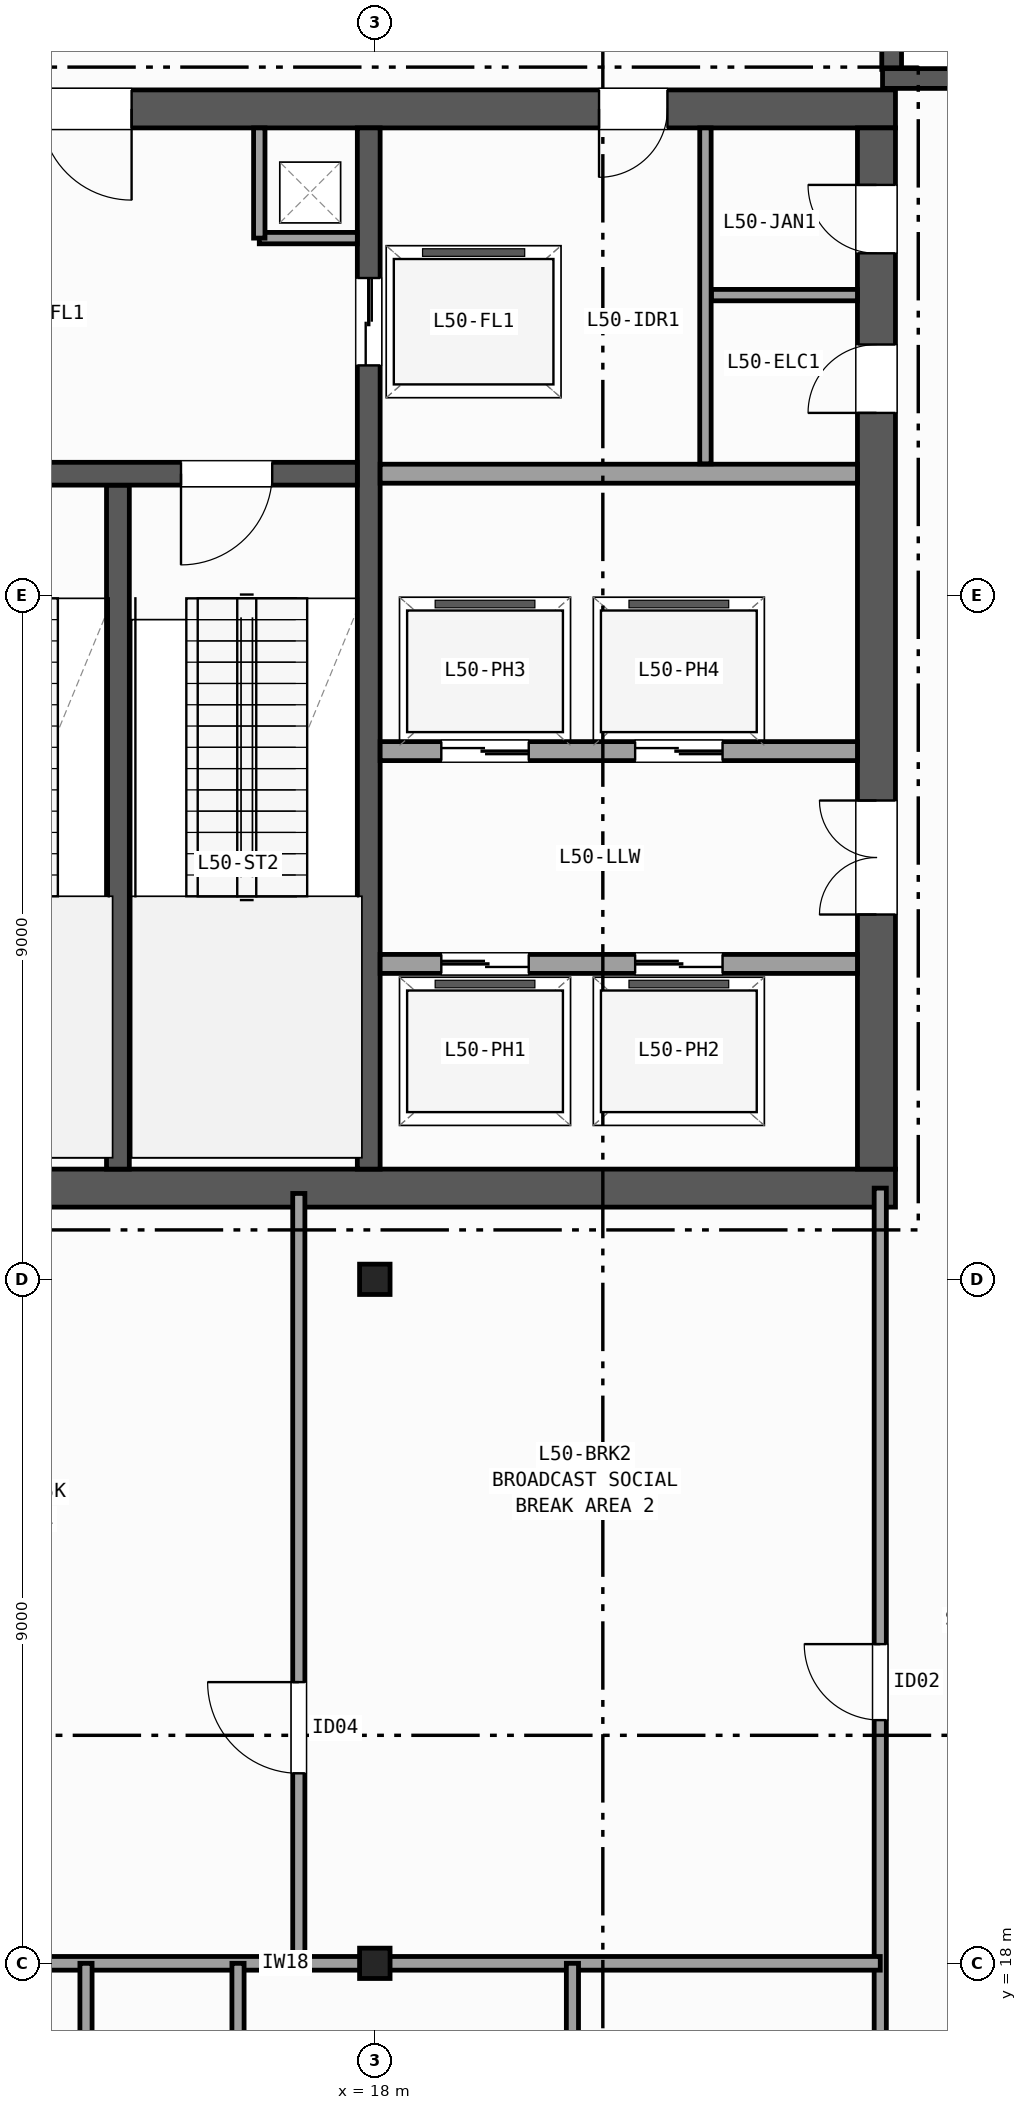
"""IFC4 building model, lengths in metres.
Left out: names, types, materials, properties, quantities, classifications, styles, units other than length and angle.
Written with IfcOpenShell. Run it as: python <this file> out.ifc"""

import sys

from ifc_helpers import new_model, si_unit, direction, frame, frame_2d, origin, origin_2d, place, context, subcontext, project, spatial, rectangle, i_section, extrude, element, fill, save


model = new_model("IFC4")
c1 = context("Model", 3, precision=1e-05, world=origin(), true_north=direction((0.0, 1.0)))
c2 = subcontext(c1, "Body", "Model", "MODEL_VIEW")
j1 = project(units=[si_unit("LENGTHUNIT", "METRE"), si_unit("PLANEANGLEUNIT", "RADIAN")], contexts=[c1])
p1 = place(None, origin())
s1 = spatial("IfcSite", under=j1, at=p1, CompositionType="ELEMENT")
p2 = place(p1, origin())
s2 = spatial("IfcBuilding", under=s1, at=p2, CompositionType="ELEMENT")
p3 = place(p2, frame((0.0, 0.0, 201.2)))
s3 = spatial("IfcBuildingStorey", under=s2, at=p3, CompositionType="ELEMENT", Elevation=201.2)
for number, where, z_axis, x_axis in (
    (1, (18.0, 18.0, 0.0), (0.0, 0.0, 1.0), (1.0, 0.0, 0.0)),
    (2, (18.0, 27.0, 0.0), (0.0, 0.0, 1.0), (1.0, 0.0, 0.0)),
):
    element("IfcColumn", number, at=place(p3, frame(where, z_axis=z_axis, x_axis=x_axis)), inside=s3, PredefinedType="COLUMN", context=c2, shape_type="SweptSolid", body=[
        extrude(i_section(OverallWidth=0.401, OverallDepth=0.399, WebThickness=0.025, FlangeThickness=0.04, FilletRadius=0.015, at=origin_2d()), origin(), (0.0, 0.0, 1.0), 5.0),
    ])
p4 = place(p3, frame((24.8, 45.0, 0.0), z_axis=(0.0, 0.0, 1.0), x_axis=(0.0, -1.0, 0.0)))
e3 = element("IfcWall", 3, at=p4, inside=s3, PredefinedType="SOLIDWALL", context=c2, shape_type="SweptSolid", body=[
    extrude(rectangle(XDim=2.08, YDim=0.26, at=frame_2d((1.04, 0.0))), origin(), (0.0, 0.0, 1.0), 4.72),
])
p5 = place(p3, frame((24.68, 42.8, 0.0), z_axis=(0.0, 0.0, 1.0), x_axis=(1.0, 0.0, 0.0)))
e4 = element("IfcWall", 4, at=p5, inside=s3, PredefinedType="SOLIDWALL", context=c2, shape_type="SweptSolid", body=[
    extrude(rectangle(XDim=2.32, YDim=0.26, at=frame_2d((1.16, 0.0))), origin(), (0.0, 0.0, 1.0), 4.72),
])
p6 = place(p3, frame((10.95, 28.2, 0.0), z_axis=(0.0, 0.0, 1.0), x_axis=(1.0, 0.0, 0.0)))
e5 = element("IfcWall", 5, at=p6, inside=s3, PredefinedType="SHEAR", context=c2, shape_type="SweptSolid", body=[
    extrude(rectangle(XDim=13.9, YDim=0.5, at=frame_2d((6.95, 0.0))), origin(), (0.0, 0.0, 1.0), 4.72),
])
p7 = place(p3, frame((24.85, 42.4, 0.0), z_axis=(0.0, 0.0, 1.0), x_axis=(-1.0, 0.0, 0.0)))
e6 = element("IfcWall", 6, at=p7, inside=s3, PredefinedType="SHEAR", context=c2, shape_type="SweptSolid", body=[
    extrude(rectangle(XDim=13.9, YDim=0.5, at=frame_2d((6.95, 0.0))), origin(), (0.0, 0.0, 1.0), 4.72),
])
p8 = place(p7, frame((10.05, 0.0, 0.0)))
e7 = element("IfcOpeningElement", 7, at=p8, cuts=e6, PredefinedType="OPENING", context=c2, shape_type="SweptSolid", body=[
    extrude(rectangle(XDim=1.2, YDim=2.15, at=frame_2d((0.6, 1.075))), frame((0.0, 0.26, 0.0), z_axis=(0.0, -1.0, 0.0), x_axis=(1.0, 0.0, 0.0)), (0.0, 0.0, 1.0), 0.52),
])
p9 = place(p7, frame((3.0, 0.0, 0.0)))
e8 = element("IfcOpeningElement", 8, at=p9, cuts=e6, PredefinedType="OPENING", context=c2, shape_type="SweptSolid", body=[
    extrude(rectangle(XDim=0.9, YDim=2.1, at=frame_2d((0.45, 1.05))), frame((0.0, 0.26, 0.0), z_axis=(0.0, -1.0, 0.0), x_axis=(1.0, 0.0, 0.0)), (0.0, 0.0, 1.0), 0.52),
])
p10 = place(p3, frame((24.6, 28.45, 0.0), z_axis=(0.0, 0.0, 1.0), x_axis=(0.0, 1.0, 0.0)))
e9 = element("IfcWall", 9, at=p10, inside=s3, PredefinedType="SHEAR", context=c2, shape_type="SweptSolid", body=[
    extrude(rectangle(XDim=13.7, YDim=0.5, at=frame_2d((6.85, 0.0))), origin(), (0.0, 0.0, 1.0), 4.72),
])
p11 = place(p10, frame((3.35, 0.0, 0.0)))
e10 = element("IfcOpeningElement", 10, at=p11, cuts=e9, PredefinedType="OPENING", context=c2, shape_type="SweptSolid", body=[
    extrude(rectangle(XDim=1.5, YDim=2.2, at=frame_2d((0.75, 1.1))), frame((0.0, 0.26, 0.0), z_axis=(0.0, -1.0, 0.0), x_axis=(1.0, 0.0, 0.0)), (0.0, 0.0, 1.0), 0.52),
])
p12 = place(p10, frame((9.95, 0.0, 0.0)))
e11 = element("IfcOpeningElement", 11, at=p12, cuts=e9, PredefinedType="OPENING", context=c2, shape_type="SweptSolid", body=[
    extrude(rectangle(XDim=0.9, YDim=2.1, at=frame_2d((0.45, 1.05))), frame((0.0, 0.26, 0.0), z_axis=(0.0, -1.0, 0.0), x_axis=(1.0, 0.0, 0.0)), (0.0, 0.0, 1.0), 0.52),
])
p13 = place(p10, frame((12.05, 0.0, 0.0)))
e12 = element("IfcOpeningElement", 12, at=p13, cuts=e9, PredefinedType="OPENING", context=c2, shape_type="SweptSolid", body=[
    extrude(rectangle(XDim=0.9, YDim=2.1, at=frame_2d((0.45, 1.05))), frame((0.0, 0.26, 0.0), z_axis=(0.0, -1.0, 0.0), x_axis=(1.0, 0.0, 0.0)), (0.0, 0.0, 1.0), 0.52),
])
p14 = place(p3, frame((14.62, 28.45, 0.0), z_axis=(0.0, 0.0, 1.0), x_axis=(0.0, 1.0, 0.0)))
e13 = element("IfcWall", 13, at=p14, inside=s3, PredefinedType="SHEAR", context=c2, shape_type="SweptSolid", body=[
    extrude(rectangle(XDim=9.0, YDim=0.3, at=frame_2d((4.5, 0.0))), origin(), (0.0, 0.0, 1.0), 4.72),
])
p15 = place(p3, frame((17.92, 42.15, 0.0), z_axis=(0.0, 0.0, 1.0), x_axis=(0.0, -1.0, 0.0)))
e14 = element("IfcWall", 14, at=p15, inside=s3, PredefinedType="SHEAR", context=c2, shape_type="SweptSolid", body=[
    extrude(rectangle(XDim=13.7, YDim=0.3, at=frame_2d((6.85, 0.0))), origin(), (0.0, 0.0, 1.0), 4.72),
])
p16 = place(p15, frame((1.975, 0.0, 0.0)))
e15 = element("IfcOpeningElement", 15, at=p16, cuts=e14, PredefinedType="OPENING", context=c2, shape_type="SweptSolid", body=[
    extrude(rectangle(XDim=1.15, YDim=2.15, at=frame_2d((0.575, 1.075))), frame((0.0, 0.16, 0.0), z_axis=(0.0, -1.0, 0.0), x_axis=(1.0, 0.0, 0.0)), (0.0, 0.0, 1.0), 0.32),
])
p17 = place(p3, frame((17.77, 37.6, 0.0), z_axis=(0.0, 0.0, 1.0), x_axis=(-1.0, 0.0, 0.0)))
e16 = element("IfcWall", 16, at=p17, inside=s3, PredefinedType="SHEAR", context=c2, shape_type="SweptSolid", body=[
    extrude(rectangle(XDim=6.32, YDim=0.3, at=frame_2d((3.16, 0.0))), origin(), (0.0, 0.0, 1.0), 4.72),
])
p18 = place(p17, frame((4.22, 0.0, 0.0)))
e17 = element("IfcOpeningElement", 17, at=p18, cuts=e16, PredefinedType="OPENING", context=c2, shape_type="SweptSolid", body=[
    extrude(rectangle(XDim=1.2, YDim=2.15, at=frame_2d((0.6, 1.075))), frame((0.0, 0.16, 0.0), z_axis=(0.0, -1.0, 0.0), x_axis=(1.0, 0.0, 0.0)), (0.0, 0.0, 1.0), 0.32),
])
p19 = place(p17, frame((1.12, 0.0, 0.0)))
e18 = element("IfcOpeningElement", 18, at=p19, cuts=e16, PredefinedType="OPENING", context=c2, shape_type="SweptSolid", body=[
    extrude(rectangle(XDim=1.2, YDim=2.15, at=frame_2d((0.6, 1.075))), frame((0.0, 0.16, 0.0), z_axis=(0.0, -1.0, 0.0), x_axis=(1.0, 0.0, 0.0)), (0.0, 0.0, 1.0), 0.32),
])
p20 = place(p3, frame((16.48, 40.7, 0.0), z_axis=(0.0, 0.0, 1.0), x_axis=(1.0, 0.0, 0.0)))
e19 = element("IfcWall", 19, at=p20, inside=s3, PredefinedType="PARTITIONING", context=c2, shape_type="SweptSolid", body=[
    extrude(rectangle(XDim=1.29, YDim=0.15, at=frame_2d((0.645, 0.0))), origin(), (0.0, 0.0, 1.0), 4.72),
])
p21 = place(p3, frame((16.48, 40.7, 0.0), z_axis=(0.0, 0.0, 1.0), x_axis=(0.0, 1.0, 0.0)))
e20 = element("IfcWall", 20, at=p21, inside=s3, PredefinedType="PARTITIONING", context=c2, shape_type="SweptSolid", body=[
    extrude(rectangle(XDim=1.45, YDim=0.15, at=frame_2d((0.725, 0.0))), origin(), (0.0, 0.0, 1.0), 4.72),
])
p22 = place(p3, frame((18.07, 37.6, 0.0), z_axis=(0.0, 0.0, 1.0), x_axis=(1.0, 0.0, 0.0)))
e21 = element("IfcWall", 21, at=p22, inside=s3, PredefinedType="PARTITIONING", context=c2, shape_type="SweptSolid", body=[
    extrude(rectangle(XDim=6.28, YDim=0.25, at=frame_2d((3.14, 0.0))), origin(), (0.0, 0.0, 1.0), 4.72),
])
p23 = place(p3, frame((18.07, 31.15, 0.0), z_axis=(0.0, 0.0, 1.0), x_axis=(1.0, 0.0, 0.0)))
e22 = element("IfcWall", 22, at=p23, inside=s3, PredefinedType="PARTITIONING", context=c2, shape_type="SweptSolid", body=[
    extrude(rectangle(XDim=6.28, YDim=0.25, at=frame_2d((3.14, 0.0))), origin(), (0.0, 0.0, 1.0), 4.72),
])
p24 = place(p23, frame((0.805, 0.0, 0.0)))
e23 = element("IfcOpeningElement", 23, at=p24, cuts=e22, PredefinedType="OPENING", context=c2, shape_type="SweptSolid", body=[
    extrude(rectangle(XDim=1.15, YDim=2.15, at=frame_2d((0.575, 1.075))), frame((0.0, 0.135, 0.0), z_axis=(0.0, -1.0, 0.0), x_axis=(1.0, 0.0, 0.0)), (0.0, 0.0, 1.0), 0.27),
])
p25 = place(p23, frame((3.355, 0.0, 0.0)))
e24 = element("IfcOpeningElement", 24, at=p25, cuts=e22, PredefinedType="OPENING", context=c2, shape_type="SweptSolid", body=[
    extrude(rectangle(XDim=1.15, YDim=2.15, at=frame_2d((0.575, 1.075))), frame((0.0, 0.135, 0.0), z_axis=(0.0, -1.0, 0.0), x_axis=(1.0, 0.0, 0.0)), (0.0, 0.0, 1.0), 0.27),
])
p26 = place(p3, frame((24.35, 33.95, 0.0), z_axis=(0.0, 0.0, 1.0), x_axis=(-1.0, 0.0, 0.0)))
e25 = element("IfcWall", 25, at=p26, inside=s3, PredefinedType="PARTITIONING", context=c2, shape_type="SweptSolid", body=[
    extrude(rectangle(XDim=6.28, YDim=0.25, at=frame_2d((3.14, 0.0))), origin(), (0.0, 0.0, 1.0), 4.72),
])
p27 = place(p26, frame((4.325, 0.0, 0.0)))
e26 = element("IfcOpeningElement", 26, at=p27, cuts=e25, PredefinedType="OPENING", context=c2, shape_type="SweptSolid", body=[
    extrude(rectangle(XDim=1.15, YDim=2.15, at=frame_2d((0.575, 1.075))), frame((0.0, 0.135, 0.0), z_axis=(0.0, -1.0, 0.0), x_axis=(1.0, 0.0, 0.0)), (0.0, 0.0, 1.0), 0.27),
])
p28 = place(p26, frame((1.775, 0.0, 0.0)))
e27 = element("IfcOpeningElement", 27, at=p28, cuts=e25, PredefinedType="OPENING", context=c2, shape_type="SweptSolid", body=[
    extrude(rectangle(XDim=1.15, YDim=2.15, at=frame_2d((0.575, 1.075))), frame((0.0, 0.135, 0.0), z_axis=(0.0, -1.0, 0.0), x_axis=(1.0, 0.0, 0.0)), (0.0, 0.0, 1.0), 0.27),
])
p29 = place(p3, frame((22.35, 37.73, 0.0), z_axis=(0.0, 0.0, 1.0), x_axis=(0.0, 1.0, 0.0)))
e28 = element("IfcWall", 28, at=p29, inside=s3, PredefinedType="PARTITIONING", context=c2, shape_type="SweptSolid", body=[
    extrude(rectangle(XDim=4.42, YDim=0.15, at=frame_2d((2.21, 0.0))), origin(), (0.0, 0.0, 1.0), 4.72),
])
p30 = place(p3, frame((22.43, 39.95, 0.0), z_axis=(0.0, 0.0, 1.0), x_axis=(1.0, 0.0, 0.0)))
e29 = element("IfcWall", 29, at=p30, inside=s3, PredefinedType="PARTITIONING", context=c2, shape_type="SweptSolid", body=[
    extrude(rectangle(XDim=1.92, YDim=0.15, at=frame_2d((0.96, 0.0))), origin(), (0.0, 0.0, 1.0), 4.72),
])
p31 = place(p3, frame((24.65, 9.0, 0.0), z_axis=(0.0, 0.0, 1.0), x_axis=(0.0, 1.0, 0.0)))
e30 = element("IfcWall", 30, at=p31, inside=s3, PredefinedType="PARTITIONING", context=c2, shape_type="SweptSolid", body=[
    extrude(rectangle(XDim=19.2, YDim=0.16, at=frame_2d((9.6, 0.0))), origin(), (0.0, 0.0, 1.0), 4.007),
])
p32 = place(p31, frame((12.2, 0.0, 0.0)))
e31 = element("IfcOpeningElement", 31, at=p32, cuts=e30, PredefinedType="OPENING", context=c2, shape_type="SweptSolid", body=[
    extrude(rectangle(XDim=1.0, YDim=2.1, at=frame_2d((0.5, 1.05))), frame((0.0, 0.09, 0.0), z_axis=(0.0, -1.0, 0.0), x_axis=(1.0, 0.0, 0.0)), (0.0, 0.0, 1.0), 0.18),
])
p33 = place(p31, frame((4.2, 0.0, 0.0)))
e32 = element("IfcOpeningElement", 32, at=p33, cuts=e30, PredefinedType="OPENING", context=c2, shape_type="SweptSolid", body=[
    extrude(rectangle(XDim=1.05, YDim=2.15, at=frame_2d((0.525, 1.075))), frame((0.0, 0.09, 0.0), z_axis=(0.0, -1.0, 0.0), x_axis=(1.0, 0.0, 0.0)), (0.0, 0.0, 1.0), 0.18),
])
p34 = place(p3, frame((9.0, 18.0, 0.0), z_axis=(0.0, 0.0, 1.0), x_axis=(1.0, 0.0, 0.0)))
e33 = element("IfcWall", 33, at=p34, inside=s3, PredefinedType="PARTITIONING", context=c2, shape_type="SweptSolid", body=[
    extrude(rectangle(XDim=15.65, YDim=0.18, at=frame_2d((7.825, 0.0))), origin(), (0.0, 0.0, 1.0), 4.007),
])
p35 = place(p3, frame((17.0, 18.0, 0.0), z_axis=(0.0, 0.0, 1.0), x_axis=(0.0, 1.0, 0.0)))
e34 = element("IfcWall", 34, at=p35, inside=s3, PredefinedType="PARTITIONING", context=c2, shape_type="SweptSolid", body=[
    extrude(rectangle(XDim=10.13, YDim=0.16, at=frame_2d((5.065, 0.0))), origin(), (0.0, 0.0, 1.0), 4.089),
])
p36 = place(p35, frame((2.5, 0.0, 0.0)))
e35 = element("IfcOpeningElement", 35, at=p36, cuts=e34, PredefinedType="OPENING", context=c2, shape_type="SweptSolid", body=[
    extrude(rectangle(XDim=1.2, YDim=2.15, at=frame_2d((0.6, 1.075))), frame((0.0, 0.09, 0.0), z_axis=(0.0, -1.0, 0.0), x_axis=(1.0, 0.0, 0.0)), (0.0, 0.0, 1.0), 0.18),
])
p37 = place(p3, frame((14.2, 7.987, 0.0), z_axis=(0.0, 0.0, 1.0), x_axis=(0.0, 1.0, 0.0)))
e36 = element("IfcWall", 36, at=p37, inside=s3, PredefinedType="PARTITIONING", context=c2, shape_type="SweptSolid", body=[
    extrude(rectangle(XDim=10.013, YDim=0.16, at=frame_2d((5.006, 0.0))), origin(), (0.0, 0.0, 1.0), 4.089),
])
p38 = place(p37, frame((4.513, 0.0, 0.0)))
e37 = element("IfcOpeningElement", 37, at=p38, cuts=e36, PredefinedType="OPENING", context=c2, shape_type="SweptSolid", body=[
    extrude(rectangle(XDim=0.86, YDim=2.05, at=frame_2d((0.43, 1.025))), frame((0.0, 0.09, 0.0), z_axis=(0.0, -1.0, 0.0), x_axis=(1.0, 0.0, 0.0)), (0.0, 0.0, 1.0), 0.18),
])
p39 = place(p3, frame((16.2, 9.0, 0.0), z_axis=(0.0, 0.0, 1.0), x_axis=(0.0, 1.0, 0.0)))
e38 = element("IfcWall", 38, at=p39, inside=s3, PredefinedType="PARTITIONING", context=c2, shape_type="SweptSolid", body=[
    extrude(rectangle(XDim=9.0, YDim=0.16, at=frame_2d((4.5, 0.0))), origin(), (0.0, 0.0, 1.0), 4.089),
])
p40 = place(p39, frame((3.5, 0.0, 0.0)))
e39 = element("IfcOpeningElement", 39, at=p40, cuts=e38, PredefinedType="OPENING", context=c2, shape_type="SweptSolid", body=[
    extrude(rectangle(XDim=0.95, YDim=2.1, at=frame_2d((0.475, 1.05))), frame((0.0, 0.09, 0.0), z_axis=(0.0, -1.0, 0.0), x_axis=(1.0, 0.0, 0.0)), (0.0, 0.0, 1.0), 0.18),
])
p41 = place(p3, frame((20.6, 9.0, 0.0), z_axis=(0.0, 0.0, 1.0), x_axis=(0.0, 1.0, 0.0)))
e40 = element("IfcWall", 40, at=p41, inside=s3, PredefinedType="PARTITIONING", context=c2, shape_type="SweptSolid", body=[
    extrude(rectangle(XDim=9.0, YDim=0.16, at=frame_2d((4.5, 0.0))), origin(), (0.0, 0.0, 1.0), 4.007),
])
p42 = place(p41, frame((3.5, 0.0, 0.0)))
e41 = element("IfcOpeningElement", 41, at=p42, cuts=e40, PredefinedType="OPENING", context=c2, shape_type="SweptSolid", body=[
    extrude(rectangle(XDim=1.0, YDim=2.1, at=frame_2d((0.5, 1.05))), frame((0.0, 0.09, 0.0), z_axis=(0.0, -1.0, 0.0), x_axis=(1.0, 0.0, 0.0)), (0.0, 0.0, 1.0), 0.18),
])
p43 = place(p19, origin())
e42 = element("IfcDoor", 42, at=p43, inside=s3, OperationType="SINGLE_SWING_RIGHT", PredefinedType="DOOR", context=c2, shape_type="SweptSolid", body=[
    extrude(rectangle(XDim=1.2, YDim=2.15, at=frame_2d((0.6, 1.075))), frame((0.0, 0.025, 0.0), z_axis=(0.0, -1.0, 0.0), x_axis=(1.0, 0.0, 0.0)), (0.0, 0.0, 1.0), 0.05),
])
fill(e18, e42)
p44 = place(p11, origin())
e43 = element("IfcDoor", 43, at=p44, inside=s3, OperationType="DOUBLE_DOOR_SINGLE_SWING", PredefinedType="DOOR", context=c2, shape_type="SweptSolid", body=[
    extrude(rectangle(XDim=1.5, YDim=2.2, at=frame_2d((0.75, 1.1))), frame((0.0, 0.025, 0.0), z_axis=(0.0, -1.0, 0.0), x_axis=(1.0, 0.0, 0.0)), (0.0, 0.0, 1.0), 0.05),
])
fill(e10, e43)
p45 = place(p8, origin())
e44 = element("IfcDoor", 44, at=p45, inside=s3, OperationType="SINGLE_SWING_LEFT", PredefinedType="DOOR", context=c2, shape_type="SweptSolid", body=[
    extrude(rectangle(XDim=1.2, YDim=2.15, at=frame_2d((0.6, 1.075))), frame((0.0, 0.025, 0.0), z_axis=(0.0, -1.0, 0.0), x_axis=(1.0, 0.0, 0.0)), (0.0, 0.0, 1.0), 0.05),
])
fill(e7, e44)
p46 = place(p12, origin())
e45 = element("IfcDoor", 45, at=p46, inside=s3, OperationType="SINGLE_SWING_LEFT", PredefinedType="DOOR", context=c2, shape_type="SweptSolid", body=[
    extrude(rectangle(XDim=0.9, YDim=2.1, at=frame_2d((0.45, 1.05))), frame((0.0, 0.025, 0.0), z_axis=(0.0, -1.0, 0.0), x_axis=(1.0, 0.0, 0.0)), (0.0, 0.0, 1.0), 0.05),
])
fill(e11, e45)
p47 = place(p9, origin())
e46 = element("IfcDoor", 46, at=p47, inside=s3, OperationType="SINGLE_SWING_RIGHT", PredefinedType="DOOR", context=c2, shape_type="SweptSolid", body=[
    extrude(rectangle(XDim=0.9, YDim=2.1, at=frame_2d((0.45, 1.05))), frame((0.0, 0.025, 0.0), z_axis=(0.0, -1.0, 0.0), x_axis=(1.0, 0.0, 0.0)), (0.0, 0.0, 1.0), 0.05),
])
fill(e8, e46)
p48 = place(p13, origin())
e47 = element("IfcDoor", 47, at=p48, inside=s3, OperationType="SINGLE_SWING_RIGHT", PredefinedType="DOOR", context=c2, shape_type="SweptSolid", body=[
    extrude(rectangle(XDim=0.9, YDim=2.1, at=frame_2d((0.45, 1.05))), frame((0.0, 0.025, 0.0), z_axis=(0.0, -1.0, 0.0), x_axis=(1.0, 0.0, 0.0)), (0.0, 0.0, 1.0), 0.05),
])
fill(e12, e47)
p49 = place(p16, origin())
e48 = element("IfcDoor", 48, at=p49, inside=s3, OperationType="DOUBLE_DOOR_SLIDING", PredefinedType="DOOR", context=c2, shape_type="SweptSolid", body=[
    extrude(rectangle(XDim=1.15, YDim=2.15, at=frame_2d((0.575, 1.075))), frame((0.0, 0.025, 0.0), z_axis=(0.0, -1.0, 0.0), x_axis=(1.0, 0.0, 0.0)), (0.0, 0.0, 1.0), 0.05),
])
fill(e15, e48)
p50 = place(p24, origin())
e49 = element("IfcDoor", 49, at=p50, inside=s3, OperationType="DOUBLE_DOOR_SLIDING", PredefinedType="DOOR", context=c2, shape_type="SweptSolid", body=[
    extrude(rectangle(XDim=1.15, YDim=2.15, at=frame_2d((0.575, 1.075))), frame((0.0, 0.025, 0.0), z_axis=(0.0, -1.0, 0.0), x_axis=(1.0, 0.0, 0.0)), (0.0, 0.0, 1.0), 0.05),
])
fill(e23, e49)
p51 = place(p25, origin())
e50 = element("IfcDoor", 50, at=p51, inside=s3, OperationType="DOUBLE_DOOR_SLIDING", PredefinedType="DOOR", context=c2, shape_type="SweptSolid", body=[
    extrude(rectangle(XDim=1.15, YDim=2.15, at=frame_2d((0.575, 1.075))), frame((0.0, 0.025, 0.0), z_axis=(0.0, -1.0, 0.0), x_axis=(1.0, 0.0, 0.0)), (0.0, 0.0, 1.0), 0.05),
])
fill(e24, e50)
p52 = place(p27, origin())
e51 = element("IfcDoor", 51, at=p52, inside=s3, OperationType="DOUBLE_DOOR_SLIDING", PredefinedType="DOOR", context=c2, shape_type="SweptSolid", body=[
    extrude(rectangle(XDim=1.15, YDim=2.15, at=frame_2d((0.575, 1.075))), frame((0.0, 0.025, 0.0), z_axis=(0.0, -1.0, 0.0), x_axis=(1.0, 0.0, 0.0)), (0.0, 0.0, 1.0), 0.05),
])
fill(e26, e51)
p53 = place(p28, origin())
e52 = element("IfcDoor", 52, at=p53, inside=s3, OperationType="DOUBLE_DOOR_SLIDING", PredefinedType="DOOR", context=c2, shape_type="SweptSolid", body=[
    extrude(rectangle(XDim=1.15, YDim=2.15, at=frame_2d((0.575, 1.075))), frame((0.0, 0.025, 0.0), z_axis=(0.0, -1.0, 0.0), x_axis=(1.0, 0.0, 0.0)), (0.0, 0.0, 1.0), 0.05),
])
fill(e27, e52)
p54 = place(p32, origin())
e53 = element("IfcDoor", 53, at=p54, inside=s3, OperationType="SINGLE_SWING_RIGHT", PredefinedType="DOOR", context=c2, shape_type="SweptSolid", body=[
    extrude(rectangle(XDim=1.0, YDim=2.1, at=frame_2d((0.5, 1.05))), frame((0.0, 0.025, 0.0), z_axis=(0.0, -1.0, 0.0), x_axis=(1.0, 0.0, 0.0)), (0.0, 0.0, 1.0), 0.05),
])
fill(e31, e53)
p55 = place(p36, origin())
e54 = element("IfcDoor", 54, at=p55, inside=s3, OperationType="SINGLE_SWING_RIGHT", PredefinedType="DOOR", context=c2, shape_type="SweptSolid", body=[
    extrude(rectangle(XDim=1.2, YDim=2.15, at=frame_2d((0.6, 1.075))), frame((0.0, 0.025, 0.0), z_axis=(0.0, -1.0, 0.0), x_axis=(1.0, 0.0, 0.0)), (0.0, 0.0, 1.0), 0.05),
])
fill(e35, e54)
save(model, sys.argv[1])
